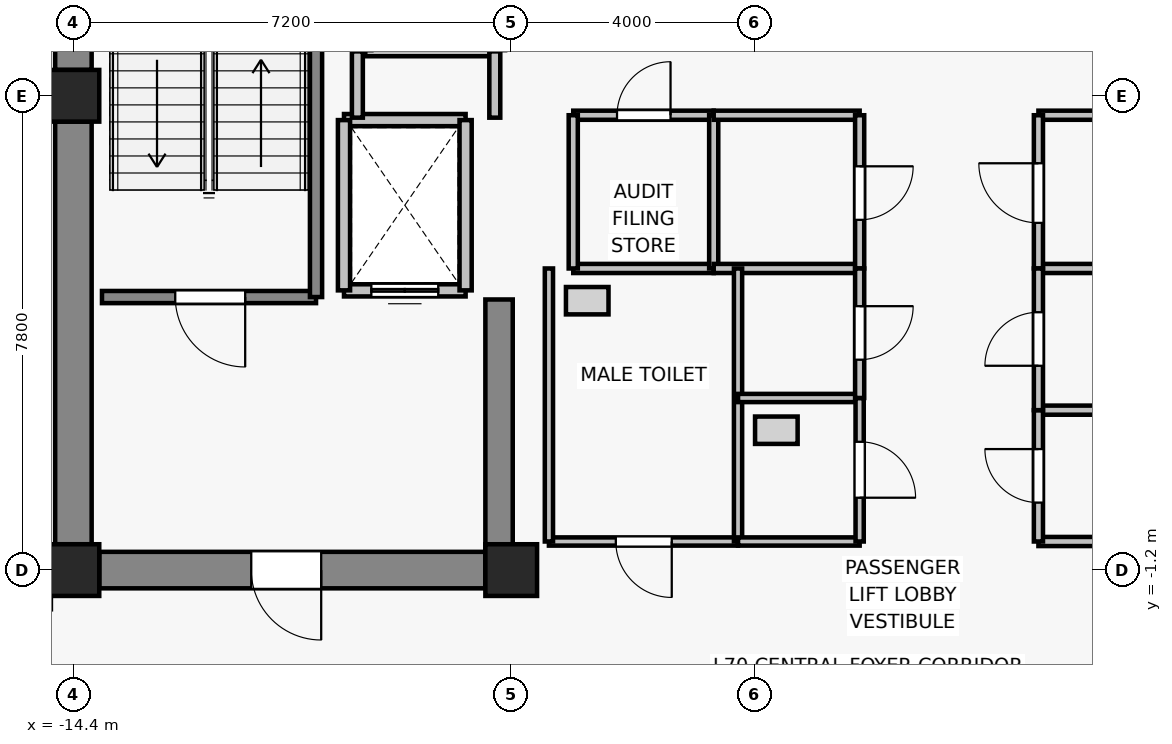
"""IFC4 building model, lengths in metres.
Left out: names, types, materials, properties, quantities, classifications, styles, units other than length and angle.
Written with IfcOpenShell. Run it as: python <this file> out.ifc"""

import sys

from ifc_helpers import new_model, si_unit, direction, frame, frame_2d, origin, origin_2d, place, context, subcontext, project, spatial, rectangle, extrude, source, transform, mapped, element, fill, save


model = new_model("IFC4")
c1 = context("Model", 3, precision=1e-05, world=origin(), true_north=direction((0.0, 1.0)))
c2 = subcontext(c1, "Body", "Model", "MODEL_VIEW")
j1 = project(units=[si_unit("LENGTHUNIT", "METRE"), si_unit("PLANEANGLEUNIT", "RADIAN")], contexts=[c1])
p1 = place(None, origin())
s1 = spatial("IfcSite", under=j1, at=p1, CompositionType="ELEMENT")
p2 = place(p1, origin())
s2 = spatial("IfcBuilding", under=s1, at=p2, CompositionType="ELEMENT")
p3 = place(p2, frame((0.0, 0.0, 248.5)))
s3 = spatial("IfcBuildingStorey", under=s2, at=p3, CompositionType="ELEMENT", Elevation=248.5)
for number, where, z_axis, x_axis in (
    (1, (-14.4, -1.2, 0.0), (0.0, 0.0, 1.0), (1.0, 0.0, 0.0)),
    (2, (-7.2, -1.2, 0.0), (0.0, 0.0, 1.0), (1.0, 0.0, 0.0)),
    (3, (-14.4, 6.6, 0.0), (0.0, 0.0, 1.0), (1.0, 0.0, 0.0)),
):
    element("IfcColumn", number, at=place(p3, frame(where, z_axis=z_axis, x_axis=x_axis)), inside=s3, PredefinedType="COLUMN", context=c2, shape_type="SweptSolid", body=[
        extrude(rectangle(XDim=0.85, YDim=0.85, at=origin_2d()), origin(), (0.0, 0.0, 1.0), 3.3),
    ])
p4 = place(p3, frame((-14.4, -0.775, 0.0), z_axis=(0.0, 0.0, 1.0), x_axis=(0.0, 1.0, 0.0)))
e4 = element("IfcWall", 4, at=p4, inside=s3, PredefinedType="SHEAR", context=c2, shape_type="SweptSolid", body=[
    extrude(rectangle(XDim=6.95, YDim=0.6, at=frame_2d((3.475, 0.0))), origin(), (0.0, 0.0, 1.0), 3.075),
])
p5 = place(p3, frame((-14.4, 7.025, 0.0), z_axis=(0.0, 0.0, 1.0), x_axis=(0.0, 1.0, 0.0)))
e5 = element("IfcWall", 5, at=p5, inside=s3, PredefinedType="SHEAR", context=c2, shape_type="SweptSolid", body=[
    extrude(rectangle(XDim=6.05, YDim=0.6, at=frame_2d((3.025, 0.0))), origin(), (0.0, 0.0, 1.0), 3.075),
])
p6 = place(p3, frame((-7.625, -1.2, 0.0), z_axis=(0.0, 0.0, 1.0), x_axis=(-1.0, 0.0, 0.0)))
e6 = element("IfcWall", 6, at=p6, inside=s3, PredefinedType="SHEAR", context=c2, shape_type="SweptSolid", body=[
    extrude(rectangle(XDim=6.35, YDim=0.6, at=frame_2d((3.175, 0.0))), origin(), (0.0, 0.0, 1.0), 3.075),
])
p7 = place(p6, frame((2.7, 0.0, 0.0)))
e7 = element("IfcOpeningElement", 7, at=p7, cuts=e6, PredefinedType="OPENING", context=c2, shape_type="SweptSolid", body=[
    extrude(rectangle(XDim=1.15, YDim=2.15, at=frame_2d((0.575, 1.075))), frame((0.0, 0.31, 0.0), z_axis=(0.0, -1.0, 0.0), x_axis=(1.0, 0.0, 0.0)), (0.0, 0.0, 1.0), 0.62),
])
p8 = place(p3, frame((-7.4, -0.9, 0.0), z_axis=(0.0, 0.0, 1.0), x_axis=(0.0, 1.0, 0.0)))
e8 = element("IfcWall", 8, at=p8, inside=s3, PredefinedType="SHEAR", context=c2, shape_type="SweptSolid", body=[
    extrude(rectangle(XDim=4.15, YDim=0.45, at=frame_2d((2.075, 0.0))), origin(), (0.0, 0.0, 1.0), 3.075),
])
p9 = place(p3, frame((-7.95, 3.4, 0.0), z_axis=(0.0, 0.0, 1.0), x_axis=(-1.0, 0.0, 0.0)))
e9 = element("IfcWall", 9, at=p9, inside=s3, PredefinedType="SOLIDWALL", context=c2, shape_type="SweptSolid", body=[
    extrude(rectangle(XDim=2.0, YDim=0.2, at=frame_2d((1.0, 0.0))), origin(), (0.0, 0.0, 1.0), 3.075),
])
p10 = place(p9, frame((0.45, 0.0, 0.0)))
e10 = element("IfcOpeningElement", 10, at=p10, cuts=e9, PredefinedType="OPENING", context=c2, shape_type="SweptSolid", body=[
    extrude(rectangle(XDim=1.1, YDim=2.2, at=frame_2d((0.55, 1.1))), frame((0.0, 0.11, 0.0), z_axis=(0.0, -1.0, 0.0), x_axis=(1.0, 0.0, 0.0)), (0.0, 0.0, 1.0), 0.22),
])
p11 = place(p3, frame((-9.95, 6.2, 0.0), z_axis=(0.0, 0.0, 1.0), x_axis=(1.0, 0.0, 0.0)))
e11 = element("IfcWall", 11, at=p11, inside=s3, PredefinedType="SOLIDWALL", context=c2, shape_type="SweptSolid", body=[
    extrude(rectangle(XDim=2.0, YDim=0.2, at=frame_2d((1.0, 0.0))), origin(), (0.0, 0.0, 1.0), 3.075),
])
for number, where, z_axis, x_axis in (
    (12, (-9.95, 3.4, 0.0), (0.0, 0.0, 1.0), (0.0, 1.0, 0.0)),
    (13, (-7.95, 6.2, 0.0), (0.0, 0.0, 1.0), (0.0, -1.0, 0.0)),
):
    element("IfcWall", number, at=place(p3, frame(where, z_axis=z_axis, x_axis=x_axis)), inside=s3, PredefinedType="SOLIDWALL", context=c2, shape_type="SweptSolid", body=[
        extrude(rectangle(XDim=2.8, YDim=0.2, at=frame_2d((1.4, 0.0))), origin(), (0.0, 0.0, 1.0), 3.075),
    ])
p12 = place(p3, frame((-7.4, 7.35, 0.0), z_axis=(0.0, 0.0, 1.0), x_axis=(-1.0, 0.0, 0.0)))
e14 = element("IfcWall", 14, at=p12, inside=s3, PredefinedType="SOLIDWALL", context=c2, shape_type="SweptSolid", body=[
    extrude(rectangle(XDim=2.2, YDim=0.2, at=frame_2d((1.1, 0.0))), origin(), (0.0, 0.0, 1.0), 2.615),
])
p13 = place(p3, frame((-10.41, 3.29, 0.0), z_axis=(0.0, 0.0, 1.0), x_axis=(-1.0, 0.0, 0.0)))
e15 = element("IfcWall", 15, at=p13, inside=s3, PredefinedType="SOLIDWALL", context=c2, shape_type="SweptSolid", body=[
    extrude(rectangle(XDim=3.52, YDim=0.2, at=frame_2d((1.76, 0.0))), origin(), (0.0, 0.0, 1.0), 3.075),
])
p14 = place(p13, frame((1.165, 0.0, 0.0)))
e16 = element("IfcOpeningElement", 16, at=p14, cuts=e15, PredefinedType="OPENING", context=c2, shape_type="SweptSolid", body=[
    extrude(rectangle(XDim=1.15, YDim=2.15, at=frame_2d((0.575, 1.075))), frame((0.0, 0.11, 0.0), z_axis=(0.0, -1.0, 0.0), x_axis=(1.0, 0.0, 0.0)), (0.0, 0.0, 1.0), 0.22),
])
p15 = place(p3, frame((-10.41, 12.13, 0.0), z_axis=(0.0, 0.0, 1.0), x_axis=(0.0, -1.0, 0.0)))
e17 = element("IfcWall", 17, at=p15, inside=s3, PredefinedType="SOLIDWALL", context=c2, shape_type="SweptSolid", body=[
    extrude(rectangle(XDim=8.84, YDim=0.2, at=frame_2d((4.42, 0.0))), origin(), (0.0, 0.0, 1.0), 3.075),
])
p16 = place(p3, frame((-9.73, 6.24, 0.0), z_axis=(0.0, 0.0, 1.0), x_axis=(0.0, 1.0, 0.0)))
e18 = element("IfcWall", 18, at=p16, inside=s3, PredefinedType="PARTITIONING", context=c2, shape_type="SweptSolid", body=[
    extrude(rectangle(XDim=1.09, YDim=0.18, at=frame_2d((0.545, 0.0))), origin(), (0.0, 0.0, 1.0), 3.075),
])
p17 = place(p3, frame((-7.47, 7.33, 0.0), z_axis=(0.0, 0.0, 1.0), x_axis=(0.0, -1.0, 0.0)))
e19 = element("IfcWall", 19, at=p17, inside=s3, PredefinedType="PARTITIONING", context=c2, shape_type="SweptSolid", body=[
    extrude(rectangle(XDim=1.09, YDim=0.18, at=frame_2d((0.545, 0.0))), origin(), (0.0, 0.0, 1.0), 2.615),
])
p18 = place(p3, frame((-3.87, 3.76, 0.0), z_axis=(0.0, 0.0, 1.0), x_axis=(-1.0, 0.0, 0.0)))
e20 = element("IfcWall", 20, at=p18, inside=s3, PredefinedType="PARTITIONING", context=c2, shape_type="SweptSolid", body=[
    extrude(rectangle(XDim=2.31, YDim=0.15, at=frame_2d((1.155, 0.0))), origin(), (0.0, 0.0, 1.0), 3.075),
])
p19 = place(p3, frame((-6.18, 6.28, 0.0), z_axis=(0.0, 0.0, 1.0), x_axis=(1.0, 0.0, 0.0)))
e21 = element("IfcWall", 21, at=p19, inside=s3, PredefinedType="PARTITIONING", context=c2, shape_type="SweptSolid", body=[
    extrude(rectangle(XDim=2.31, YDim=0.15, at=frame_2d((1.155, 0.0))), origin(), (0.0, 0.0, 1.0), 3.075),
])
p20 = place(p19, frame((0.72, 0.0, 0.0)))
e22 = element("IfcOpeningElement", 22, at=p20, cuts=e21, PredefinedType="OPENING", context=c2, shape_type="SweptSolid", body=[
    extrude(rectangle(XDim=0.88, YDim=2.1, at=frame_2d((0.44, 1.05))), frame((0.0, 0.085, 0.0), z_axis=(0.0, -1.0, 0.0), x_axis=(1.0, 0.0, 0.0)), (0.0, 0.0, 1.0), 0.17),
])
for number, where, z_axis, x_axis in (
    (23, (-6.18, 3.76, 0.0), (0.0, 0.0, 1.0), (0.0, 1.0, 0.0)),
    (24, (-3.87, 6.28, 0.0), (0.0, 0.0, 1.0), (0.0, -1.0, 0.0)),
):
    element("IfcWall", number, at=place(p3, frame(where, z_axis=z_axis, x_axis=x_axis)), inside=s3, PredefinedType="PARTITIONING", context=c2, shape_type="SweptSolid", body=[
        extrude(rectangle(XDim=2.52, YDim=0.15, at=frame_2d((1.26, 0.0))), origin(), (0.0, 0.0, 1.0), 3.075),
    ])
for number, where, z_axis, x_axis in (
    (25, (-1.47, 3.76, 0.0), (0.0, 0.0, 1.0), (-1.0, 0.0, 0.0)),
    (26, (-3.87, 6.28, 0.0), (0.0, 0.0, 1.0), (1.0, 0.0, 0.0)),
):
    element("IfcWall", number, at=place(p3, frame(where, z_axis=z_axis, x_axis=x_axis)), inside=s3, PredefinedType="PARTITIONING", context=c2, shape_type="SweptSolid", body=[
        extrude(rectangle(XDim=2.4, YDim=0.15, at=frame_2d((1.2, 0.0))), origin(), (0.0, 0.0, 1.0), 3.075),
    ])
p21 = place(p3, frame((-1.47, 6.28, 0.0), z_axis=(0.0, 0.0, 1.0), x_axis=(0.0, -1.0, 0.0)))
e27 = element("IfcWall", 27, at=p21, inside=s3, PredefinedType="PARTITIONING", context=c2, shape_type="SweptSolid", body=[
    extrude(rectangle(XDim=2.52, YDim=0.15, at=frame_2d((1.26, 0.0))), origin(), (0.0, 0.0, 1.0), 3.075),
])
p22 = place(p21, frame((0.84, 0.0, 0.0)))
e28 = element("IfcOpeningElement", 28, at=p22, cuts=e27, PredefinedType="OPENING", context=c2, shape_type="SweptSolid", body=[
    extrude(rectangle(XDim=0.88, YDim=2.1, at=frame_2d((0.44, 1.05))), frame((0.0, 0.085, 0.0), z_axis=(0.0, -1.0, 0.0), x_axis=(1.0, 0.0, 0.0)), (0.0, 0.0, 1.0), 0.17),
])
for number, where, z_axis, x_axis in (
    (29, (6.38, 3.76, 0.0), (0.0, 0.0, 1.0), (-1.0, 0.0, 0.0)),
    (30, (1.47, 6.28, 0.0), (0.0, 0.0, 1.0), (1.0, 0.0, 0.0)),
):
    element("IfcWall", number, at=place(p3, frame(where, z_axis=z_axis, x_axis=x_axis)), inside=s3, PredefinedType="PARTITIONING", context=c2, shape_type="SweptSolid", body=[
        extrude(rectangle(XDim=4.91, YDim=0.15, at=frame_2d((2.455, 0.0))), origin(), (0.0, 0.0, 1.0), 3.075),
    ])
p23 = place(p3, frame((1.47, 3.76, 0.0), z_axis=(0.0, 0.0, 1.0), x_axis=(0.0, 1.0, 0.0)))
e31 = element("IfcWall", 31, at=p23, inside=s3, PredefinedType="PARTITIONING", context=c2, shape_type="SweptSolid", body=[
    extrude(rectangle(XDim=2.52, YDim=0.15, at=frame_2d((1.26, 0.0))), origin(), (0.0, 0.0, 1.0), 3.075),
])
p24 = place(p23, frame((0.75, 0.0, 0.0)))
e32 = element("IfcOpeningElement", 32, at=p24, cuts=e31, PredefinedType="OPENING", context=c2, shape_type="SweptSolid", body=[
    extrude(rectangle(XDim=0.98, YDim=2.15, at=frame_2d((0.49, 1.075))), frame((0.0, 0.085, 0.0), z_axis=(0.0, -1.0, 0.0), x_axis=(1.0, 0.0, 0.0)), (0.0, 0.0, 1.0), 0.17),
])
p25 = place(p3, frame((-3.47, -0.73, 0.0), z_axis=(0.0, 0.0, 1.0), x_axis=(-1.0, 0.0, 0.0)))
e33 = element("IfcWall", 33, at=p25, inside=s3, PredefinedType="PARTITIONING", context=c2, shape_type="SweptSolid", body=[
    extrude(rectangle(XDim=3.11, YDim=0.135, at=frame_2d((1.555, 0.0))), origin(), (0.0, 0.0, 1.0), 3.075),
])
p26 = place(p25, frame((1.09, 0.0, 0.0)))
e34 = element("IfcOpeningElement", 34, at=p26, cuts=e33, PredefinedType="OPENING", context=c2, shape_type="SweptSolid", body=[
    extrude(rectangle(XDim=0.92, YDim=2.1, at=frame_2d((0.46, 1.05))), frame((0.0, 0.077, 0.0), z_axis=(0.0, -1.0, 0.0), x_axis=(1.0, 0.0, 0.0)), (0.0, 0.0, 1.0), 0.155),
])
for number, where, z_axis, x_axis in (
    (35, (-6.58, -0.73, 0.0), (0.0, 0.0, 1.0), (0.0, 1.0, 0.0)),
    (36, (-3.47, 3.76, 0.0), (0.0, 0.0, 1.0), (0.0, -1.0, 0.0)),
):
    element("IfcWall", number, at=place(p3, frame(where, z_axis=z_axis, x_axis=x_axis)), inside=s3, PredefinedType="PARTITIONING", context=c2, shape_type="SweptSolid", body=[
        extrude(rectangle(XDim=4.49, YDim=0.135, at=frame_2d((2.245, 0.0))), origin(), (0.0, 0.0, 1.0), 3.075),
    ])
for number, where, z_axis, x_axis in (
    (37, (-1.47, -0.73, 0.0), (0.0, 0.0, 1.0), (-1.0, 0.0, 0.0)),
    (38, (-3.47, 1.63, 0.0), (0.0, 0.0, 1.0), (1.0, 0.0, 0.0)),
):
    element("IfcWall", number, at=place(p3, frame(where, z_axis=z_axis, x_axis=x_axis)), inside=s3, PredefinedType="PARTITIONING", context=c2, shape_type="SweptSolid", body=[
        extrude(rectangle(XDim=2.0, YDim=0.135, at=frame_2d((1.0, 0.0))), origin(), (0.0, 0.0, 1.0), 3.075),
    ])
p27 = place(p3, frame((-1.47, 1.63, 0.0), z_axis=(0.0, 0.0, 1.0), x_axis=(0.0, -1.0, 0.0)))
e39 = element("IfcWall", 39, at=p27, inside=s3, PredefinedType="PARTITIONING", context=c2, shape_type="SweptSolid", body=[
    extrude(rectangle(XDim=2.36, YDim=0.135, at=frame_2d((1.18, 0.0))), origin(), (0.0, 0.0, 1.0), 3.075),
])
p28 = place(p27, frame((0.72, 0.0, 0.0)))
e40 = element("IfcOpeningElement", 40, at=p28, cuts=e39, PredefinedType="OPENING", context=c2, shape_type="SweptSolid", body=[
    extrude(rectangle(XDim=0.92, YDim=2.1, at=frame_2d((0.46, 1.05))), frame((0.0, 0.077, 0.0), z_axis=(0.0, -1.0, 0.0), x_axis=(1.0, 0.0, 0.0)), (0.0, 0.0, 1.0), 0.155),
])
p29 = place(p3, frame((-1.47, 3.76, 0.0), z_axis=(0.0, 0.0, 1.0), x_axis=(0.0, -1.0, 0.0)))
e41 = element("IfcWall", 41, at=p29, inside=s3, PredefinedType="PARTITIONING", context=c2, shape_type="SweptSolid", body=[
    extrude(rectangle(XDim=2.13, YDim=0.15, at=frame_2d((1.065, 0.0))), origin(), (0.0, 0.0, 1.0), 3.075),
])
p30 = place(p29, frame((0.62, 0.0, 0.0)))
e42 = element("IfcOpeningElement", 42, at=p30, cuts=e41, PredefinedType="OPENING", context=c2, shape_type="SweptSolid", body=[
    extrude(rectangle(XDim=0.88, YDim=2.1, at=frame_2d((0.44, 1.05))), frame((0.0, 0.085, 0.0), z_axis=(0.0, -1.0, 0.0), x_axis=(1.0, 0.0, 0.0)), (0.0, 0.0, 1.0), 0.17),
])
for number, where, z_axis, x_axis in (
    (43, (3.68, -0.73, 0.0), (0.0, 0.0, 1.0), (-1.0, 0.0, 0.0)),
    (44, (1.47, 1.43, 0.0), (0.0, 0.0, 1.0), (1.0, 0.0, 0.0)),
):
    element("IfcWall", number, at=place(p3, frame(where, z_axis=z_axis, x_axis=x_axis)), inside=s3, PredefinedType="PARTITIONING", context=c2, shape_type="SweptSolid", body=[
        extrude(rectangle(XDim=2.21, YDim=0.15, at=frame_2d((1.105, 0.0))), origin(), (0.0, 0.0, 1.0), 3.075),
    ])
p31 = place(p3, frame((1.47, -0.73, 0.0), z_axis=(0.0, 0.0, 1.0), x_axis=(0.0, 1.0, 0.0)))
e45 = element("IfcWall", 45, at=p31, inside=s3, PredefinedType="PARTITIONING", context=c2, shape_type="SweptSolid", body=[
    extrude(rectangle(XDim=2.16, YDim=0.15, at=frame_2d((1.08, 0.0))), origin(), (0.0, 0.0, 1.0), 3.075),
])
p32 = place(p31, frame((0.64, 0.0, 0.0)))
e46 = element("IfcOpeningElement", 46, at=p32, cuts=e45, PredefinedType="OPENING", context=c2, shape_type="SweptSolid", body=[
    extrude(rectangle(XDim=0.88, YDim=2.1, at=frame_2d((0.44, 1.05))), frame((0.0, 0.085, 0.0), z_axis=(0.0, -1.0, 0.0), x_axis=(1.0, 0.0, 0.0)), (0.0, 0.0, 1.0), 0.17),
])
p33 = place(p3, frame((1.47, 1.43, 0.0), z_axis=(0.0, 0.0, 1.0), x_axis=(0.0, 1.0, 0.0)))
e47 = element("IfcWall", 47, at=p33, inside=s3, PredefinedType="PARTITIONING", context=c2, shape_type="SweptSolid", body=[
    extrude(rectangle(XDim=2.33, YDim=0.15, at=frame_2d((1.165, 0.0))), origin(), (0.0, 0.0, 1.0), 3.075),
])
p34 = place(p33, frame((0.73, 0.0, 0.0)))
e48 = element("IfcOpeningElement", 48, at=p34, cuts=e47, PredefinedType="OPENING", context=c2, shape_type="SweptSolid", body=[
    extrude(rectangle(XDim=0.88, YDim=2.15, at=frame_2d((0.44, 1.075))), frame((0.0, 0.085, 0.0), z_axis=(0.0, -1.0, 0.0), x_axis=(1.0, 0.0, 0.0)), (0.0, 0.0, 1.0), 0.17),
])
m1 = source(origin(), c2, "Body", "SweptSolid", [
    extrude(rectangle(XDim=1.1, YDim=2.2, at=frame_2d((0.55, 1.1))), frame((0.0, 0.025, 0.0), z_axis=(0.0, -1.0, 0.0), x_axis=(1.0, 0.0, 0.0)), (0.0, 0.0, 1.0), 0.05),
])
p35 = place(p10, origin())
e49 = element("IfcDoor", 49, at=p35, inside=s3, OperationType="DOUBLE_DOOR_SLIDING", PredefinedType="DOOR", context=c2, shape_type="MappedRepresentation", body=[
    mapped(m1, transform((0.0, 0.0, 0.0), x_axis=(1.0, 0.0, 0.0), y_axis=(0.0, 1.0, 0.0), z_axis=(0.0, 0.0, 1.0), scale=1.0)),
])
fill(e10, e49)
m2 = source(origin(), c2, "Body", "SweptSolid", [
    extrude(rectangle(XDim=1.15, YDim=2.15, at=frame_2d((0.575, 1.075))), frame((0.0, 0.025, 0.0), z_axis=(0.0, -1.0, 0.0), x_axis=(1.0, 0.0, 0.0)), (0.0, 0.0, 1.0), 0.05),
])
p36 = place(p14, origin())
e50 = element("IfcDoor", 50, at=p36, inside=s3, OperationType="SINGLE_SWING_LEFT", PredefinedType="DOOR", context=c2, shape_type="MappedRepresentation", body=[
    mapped(m2, transform((0.0, 0.0, 0.0), x_axis=(1.0, 0.0, 0.0), y_axis=(0.0, 1.0, 0.0), z_axis=(0.0, 0.0, 1.0), scale=1.0)),
])
fill(e16, e50)
p37 = place(p7, origin())
e51 = element("IfcDoor", 51, at=p37, inside=s3, OperationType="SINGLE_SWING_LEFT", PredefinedType="DOOR", context=c2, shape_type="MappedRepresentation", body=[
    mapped(m2, transform((0.0, 0.0, 0.0), x_axis=(1.0, 0.0, 0.0), y_axis=(0.0, 1.0, 0.0), z_axis=(0.0, 0.0, 1.0), scale=1.0)),
])
fill(e7, e51)
m3 = source(origin(), c2, "Body", "SweptSolid", [
    extrude(rectangle(XDim=0.88, YDim=2.1, at=frame_2d((0.44, 1.05))), frame((0.0, 0.025, 0.0), z_axis=(0.0, -1.0, 0.0), x_axis=(1.0, 0.0, 0.0)), (0.0, 0.0, 1.0), 0.05),
])
p38 = place(p20, origin())
e52 = element("IfcDoor", 52, at=p38, inside=s3, OperationType="SINGLE_SWING_RIGHT", PredefinedType="DOOR", context=c2, shape_type="MappedRepresentation", body=[
    mapped(m3, transform((0.0, 0.0, 0.0), x_axis=(1.0, 0.0, 0.0), y_axis=(0.0, 1.0, 0.0), z_axis=(0.0, 0.0, 1.0), scale=1.0)),
])
fill(e22, e52)
p39 = place(p22, origin())
e53 = element("IfcDoor", 53, at=p39, inside=s3, OperationType="SINGLE_SWING_LEFT", PredefinedType="DOOR", context=c2, shape_type="MappedRepresentation", body=[
    mapped(m3, transform((0.0, 0.0, 0.0), x_axis=(1.0, 0.0, 0.0), y_axis=(0.0, 1.0, 0.0), z_axis=(0.0, 0.0, 1.0), scale=1.0)),
])
fill(e28, e53)
m4 = source(origin(), c2, "Body", "SweptSolid", [
    extrude(rectangle(XDim=0.98, YDim=2.15, at=frame_2d((0.49, 1.075))), frame((0.0, 0.025, 0.0), z_axis=(0.0, -1.0, 0.0), x_axis=(1.0, 0.0, 0.0)), (0.0, 0.0, 1.0), 0.05),
])
p40 = place(p24, origin())
e54 = element("IfcDoor", 54, at=p40, inside=s3, OperationType="SINGLE_SWING_RIGHT", PredefinedType="DOOR", context=c2, shape_type="MappedRepresentation", body=[
    mapped(m4, transform((0.0, 0.0, 0.0), x_axis=(1.0, 0.0, 0.0), y_axis=(0.0, 1.0, 0.0), z_axis=(0.0, 0.0, 1.0), scale=1.0)),
])
fill(e32, e54)
m5 = source(origin(), c2, "Body", "SweptSolid", [
    extrude(rectangle(XDim=0.92, YDim=2.1, at=frame_2d((0.46, 1.05))), frame((0.0, 0.025, 0.0), z_axis=(0.0, -1.0, 0.0), x_axis=(1.0, 0.0, 0.0)), (0.0, 0.0, 1.0), 0.05),
])
p41 = place(p26, origin())
e55 = element("IfcDoor", 55, at=p41, inside=s3, OperationType="SINGLE_SWING_LEFT", PredefinedType="DOOR", context=c2, shape_type="MappedRepresentation", body=[
    mapped(m5, transform((0.0, 0.0, 0.0), x_axis=(1.0, 0.0, 0.0), y_axis=(0.0, 1.0, 0.0), z_axis=(0.0, 0.0, 1.0), scale=1.0)),
])
fill(e34, e55)
p42 = place(p28, origin())
e56 = element("IfcDoor", 56, at=p42, inside=s3, OperationType="SINGLE_SWING_RIGHT", PredefinedType="DOOR", context=c2, shape_type="MappedRepresentation", body=[
    mapped(m5, transform((0.0, 0.0, 0.0), x_axis=(1.0, 0.0, 0.0), y_axis=(0.0, 1.0, 0.0), z_axis=(0.0, 0.0, 1.0), scale=1.0)),
])
fill(e40, e56)
p43 = place(p30, origin())
e57 = element("IfcDoor", 57, at=p43, inside=s3, OperationType="SINGLE_SWING_LEFT", PredefinedType="DOOR", context=c2, shape_type="MappedRepresentation", body=[
    mapped(m3, transform((0.0, 0.0, 0.0), x_axis=(1.0, 0.0, 0.0), y_axis=(0.0, 1.0, 0.0), z_axis=(0.0, 0.0, 1.0), scale=1.0)),
])
fill(e42, e57)
p44 = place(p32, origin())
e58 = element("IfcDoor", 58, at=p44, inside=s3, OperationType="SINGLE_SWING_RIGHT", PredefinedType="DOOR", context=c2, shape_type="MappedRepresentation", body=[
    mapped(m3, transform((0.0, 0.0, 0.0), x_axis=(1.0, 0.0, 0.0), y_axis=(0.0, 1.0, 0.0), z_axis=(0.0, 0.0, 1.0), scale=1.0)),
])
fill(e46, e58)
m6 = source(origin(), c2, "Body", "SweptSolid", [
    extrude(rectangle(XDim=0.88, YDim=2.15, at=frame_2d((0.44, 1.075))), frame((0.0, 0.025, 0.0), z_axis=(0.0, -1.0, 0.0), x_axis=(1.0, 0.0, 0.0)), (0.0, 0.0, 1.0), 0.05),
])
p45 = place(p34, origin())
e59 = element("IfcDoor", 59, at=p45, inside=s3, OperationType="SINGLE_SWING_LEFT", PredefinedType="DOOR", context=c2, shape_type="MappedRepresentation", body=[
    mapped(m6, transform((0.0, 0.0, 0.0), x_axis=(1.0, 0.0, 0.0), y_axis=(0.0, 1.0, 0.0), z_axis=(0.0, 0.0, 1.0), scale=1.0)),
])
fill(e48, e59)
save(model, sys.argv[1])
